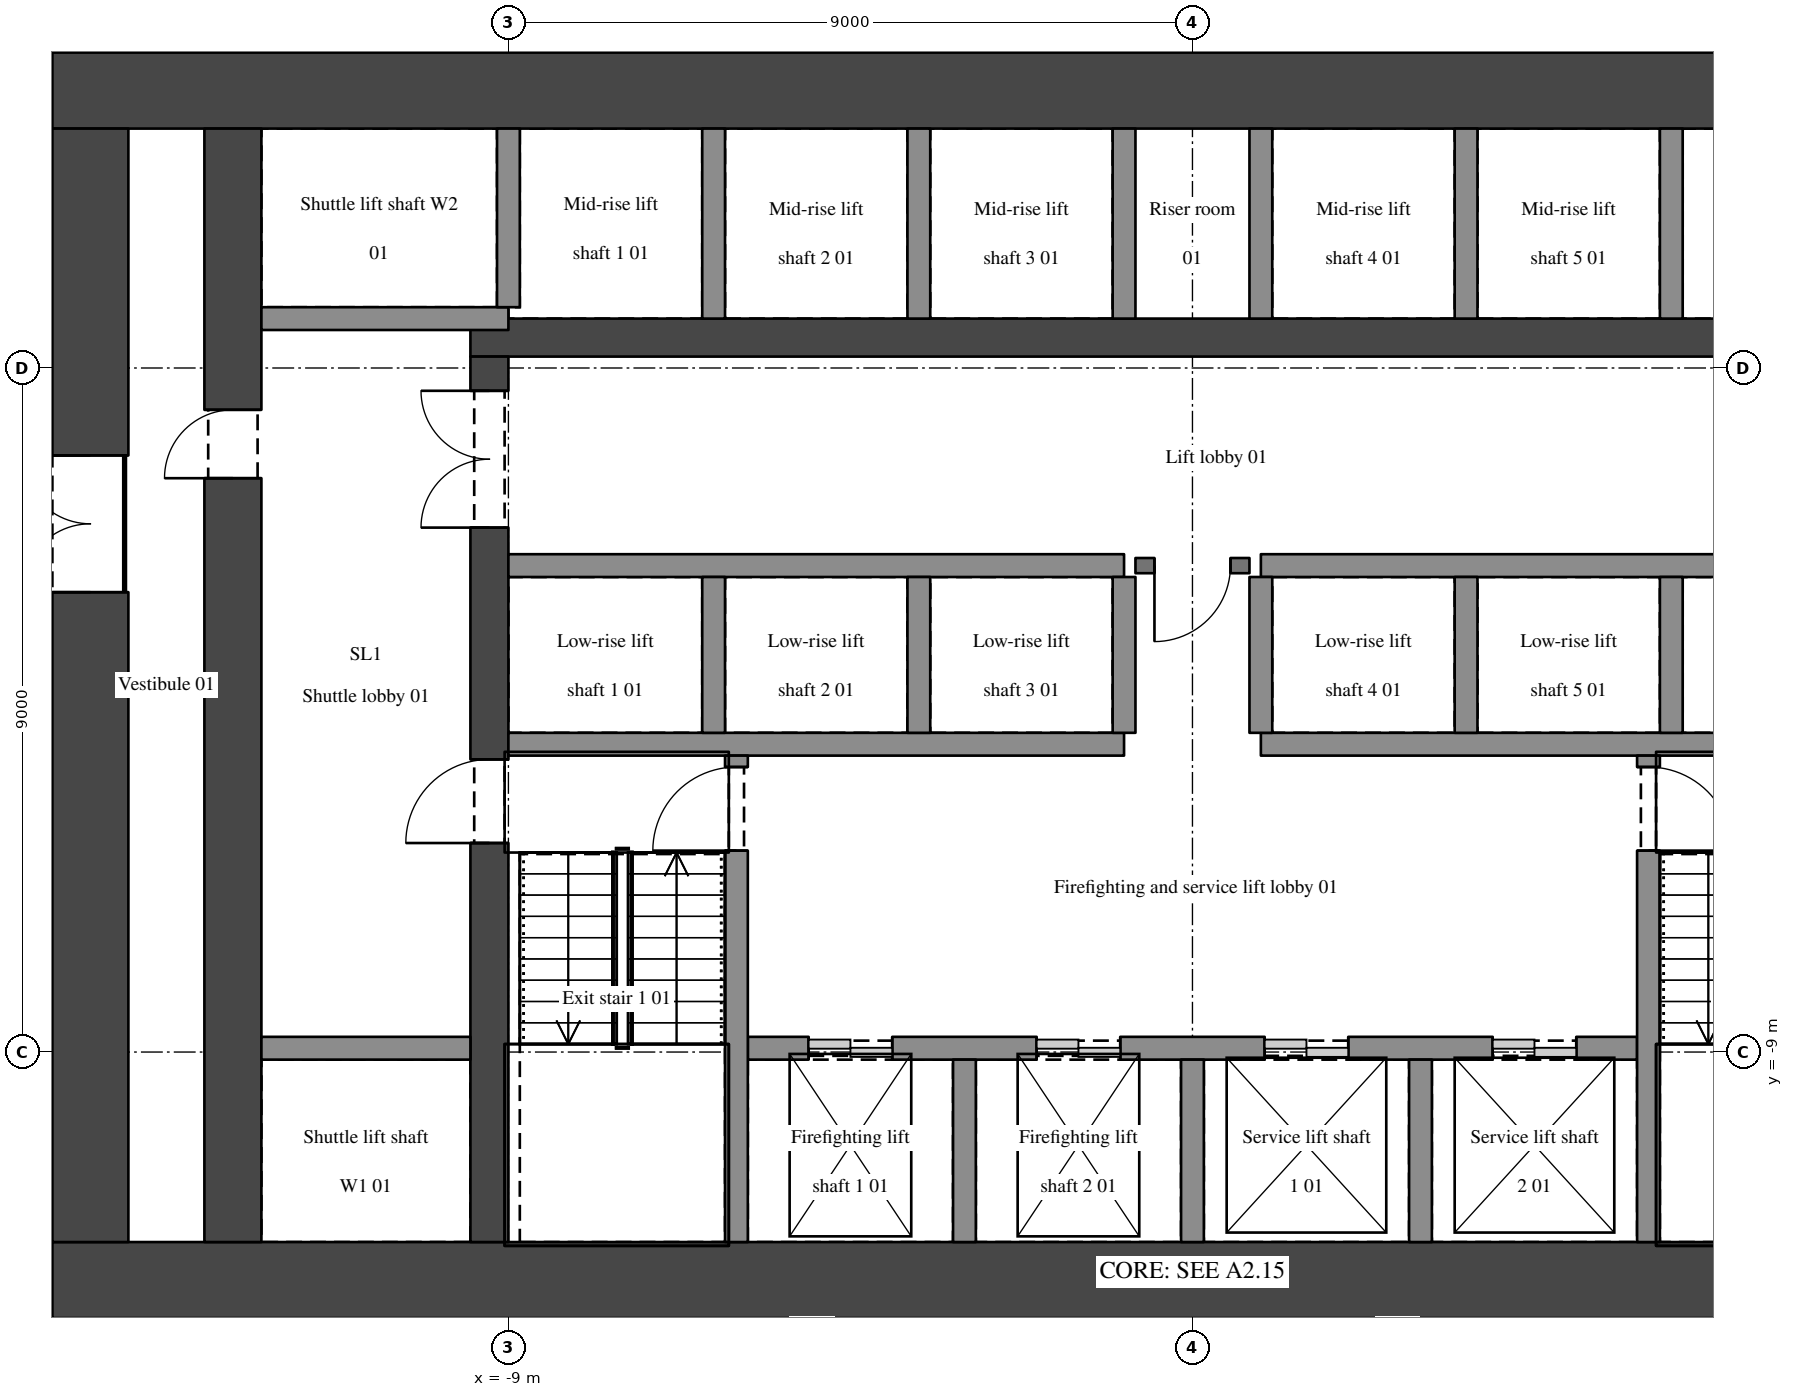
"""IFC4 building model, lengths in metres.
Left out: names, types, materials, properties, quantities, classifications, styles, units other than length and angle.
Written with IfcOpenShell. Run it as: python <this file> out.ifc"""

import sys

from ifc_helpers import new_model, si_unit, direction, frame, frame_2d, origin, place, context, subcontext, project, spatial, rectangle, extrude, element, fill, save


model = new_model("IFC4")
c1 = context("Model", 3, precision=1e-05, world=origin(), true_north=direction((0.0, 1.0)))
c2 = subcontext(c1, "Body", "Model", "MODEL_VIEW")
j1 = project(units=[si_unit("LENGTHUNIT", "METRE"), si_unit("PLANEANGLEUNIT", "RADIAN")], contexts=[c1])
p1 = place(None, origin())
s1 = spatial("IfcSite", under=j1, at=p1, CompositionType="ELEMENT")
p2 = place(p1, origin())
s2 = spatial("IfcBuilding", under=s1, at=p2, CompositionType="ELEMENT")
p3 = place(p2, frame((0.0, 0.0, 114.3)))
s3 = spatial("IfcBuildingStorey", under=s2, at=p3, CompositionType="ELEMENT", Elevation=114.3)
for number, where, z_axis, x_axis in (
    (1, (-15.0, -12.0, 0.0), (0.0, 0.0, 1.0), (1.0, 0.0, 0.0)),
    (2, (-15.0, 3.65, 0.0), (0.0, 0.0, 1.0), (1.0, 0.0, 0.0)),
):
    element("IfcWall", number, at=place(p3, frame(where, z_axis=z_axis, x_axis=x_axis)), inside=s3, PredefinedType="SHEAR", context=c2, shape_type="SweptSolid", body=[
        extrude(rectangle(XDim=30.0, YDim=1.0, at=frame_2d((15.0, 0.0))), origin(), (0.0, 0.0, 1.0), 7.2),
    ])
p4 = place(p3, frame((-14.5, -11.5, 0.0), z_axis=(0.0, 0.0, 1.0), x_axis=(0.0, 1.0, 0.0)))
e3 = element("IfcWall", 3, at=p4, inside=s3, PredefinedType="SHEAR", context=c2, shape_type="SweptSolid", body=[
    extrude(rectangle(XDim=14.65, YDim=1.0, at=frame_2d((7.325, 0.0))), origin(), (0.0, 0.0, 1.0), 7.2),
])
p5 = place(p4, frame((8.55, 0.0, 0.0)))
e4 = element("IfcOpeningElement", 4, at=p5, cuts=e3, PredefinedType="OPENING", context=c2, shape_type="SweptSolid", body=[
    extrude(rectangle(XDim=1.8, YDim=2.1, at=frame_2d((0.9, 1.05))), frame((0.0, 0.51, 0.0), z_axis=(0.0, -1.0, 0.0), x_axis=(1.0, 0.0, 0.0)), (0.0, 0.0, 1.0), 1.02),
])
p6 = place(p3, frame((-12.625, -11.5, 0.0), z_axis=(0.0, 0.0, 1.0), x_axis=(0.0, 1.0, 0.0)))
e5 = element("IfcWall", 5, at=p6, inside=s3, PredefinedType="SHEAR", context=c2, shape_type="SweptSolid", body=[
    extrude(rectangle(XDim=14.65, YDim=0.75, at=frame_2d((7.325, 0.0))), origin(), (0.0, 0.0, 1.0), 7.2),
])
p7 = place(p6, frame((10.05, 0.0, 0.0)))
e6 = element("IfcOpeningElement", 6, at=p7, cuts=e5, PredefinedType="OPENING", context=c2, shape_type="SweptSolid", body=[
    extrude(rectangle(XDim=0.9, YDim=2.1, at=frame_2d((0.45, 1.05))), frame((0.0, 0.385, 0.0), z_axis=(0.0, -1.0, 0.0), x_axis=(1.0, 0.0, 0.0)), (0.0, 0.0, 1.0), 0.77),
])
p8 = place(p3, frame((-9.5, 0.4, 0.0), z_axis=(0.0, 0.0, 1.0), x_axis=(1.0, 0.0, 0.0)))
e7 = element("IfcWall", 7, at=p8, inside=s3, PredefinedType="SHEAR", context=c2, shape_type="SweptSolid", body=[
    extrude(rectangle(XDim=19.0, YDim=0.5, at=frame_2d((9.5, 0.0))), origin(), (0.0, 0.0, 1.0), 7.2),
])
p9 = place(p3, frame((-9.25, -11.5, 0.0), z_axis=(0.0, 0.0, 1.0), x_axis=(0.0, 1.0, 0.0)))
e8 = element("IfcWall", 8, at=p9, inside=s3, PredefinedType="SHEAR", context=c2, shape_type="SweptSolid", body=[
    extrude(rectangle(XDim=11.65, YDim=0.5, at=frame_2d((5.825, 0.0))), origin(), (0.0, 0.0, 1.0), 7.2),
])
p10 = place(p9, frame((9.4, 0.0, 0.0)))
e9 = element("IfcOpeningElement", 9, at=p10, cuts=e8, PredefinedType="OPENING", context=c2, shape_type="SweptSolid", body=[
    extrude(rectangle(XDim=1.8, YDim=2.1, at=frame_2d((0.9, 1.05))), frame((0.0, 0.26, 0.0), z_axis=(0.0, -1.0, 0.0), x_axis=(1.0, 0.0, 0.0)), (0.0, 0.0, 1.0), 0.52),
])
p11 = place(p9, frame((5.25, 0.0, 0.0)))
e10 = element("IfcOpeningElement", 10, at=p11, cuts=e8, PredefinedType="OPENING", context=c2, shape_type="SweptSolid", body=[
    extrude(rectangle(XDim=1.1, YDim=2.1, at=frame_2d((0.55, 1.05))), frame((0.0, 0.26, 0.0), z_axis=(0.0, -1.0, 0.0), x_axis=(1.0, 0.0, 0.0)), (0.0, 0.0, 1.0), 0.52),
])
p12 = place(p3, frame((-12.25, -8.95, 0.0), z_axis=(0.0, 0.0, 1.0), x_axis=(1.0, 0.0, 0.0)))
e11 = element("IfcWall", 11, at=p12, inside=s3, PredefinedType="SHEAR", context=c2, shape_type="SweptSolid", body=[
    extrude(rectangle(XDim=2.75, YDim=0.3, at=frame_2d((1.375, 0.0))), origin(), (0.0, 0.0, 1.0), 7.2),
])
p13 = place(p3, frame((-5.85, -8.95, 0.0), z_axis=(0.0, 0.0, 1.0), x_axis=(1.0, 0.0, 0.0)))
e12 = element("IfcWall", 12, at=p13, inside=s3, PredefinedType="SHEAR", context=c2, shape_type="SweptSolid", body=[
    extrude(rectangle(XDim=11.7, YDim=0.3, at=frame_2d((5.85, 0.0))), origin(), (0.0, 0.0, 1.0), 7.2),
])
p14 = place(p13, frame((0.8, 0.0, 0.0)))
e13 = element("IfcOpeningElement", 13, at=p14, cuts=e12, PredefinedType="OPENING", context=c2, shape_type="SweptSolid", body=[
    extrude(rectangle(XDim=1.1, YDim=2.1, at=frame_2d((0.55, 1.05))), frame((0.0, 0.16, 0.0), z_axis=(0.0, -1.0, 0.0), x_axis=(1.0, 0.0, 0.0)), (0.0, 0.0, 1.0), 0.32),
])
p15 = place(p13, frame((3.8, 0.0, 0.0)))
e14 = element("IfcOpeningElement", 14, at=p15, cuts=e12, PredefinedType="OPENING", context=c2, shape_type="SweptSolid", body=[
    extrude(rectangle(XDim=1.1, YDim=2.1, at=frame_2d((0.55, 1.05))), frame((0.0, 0.16, 0.0), z_axis=(0.0, -1.0, 0.0), x_axis=(1.0, 0.0, 0.0)), (0.0, 0.0, 1.0), 0.32),
])
p16 = place(p13, frame((6.8, 0.0, 0.0)))
e15 = element("IfcOpeningElement", 15, at=p16, cuts=e12, PredefinedType="OPENING", context=c2, shape_type="SweptSolid", body=[
    extrude(rectangle(XDim=1.1, YDim=2.1, at=frame_2d((0.55, 1.05))), frame((0.0, 0.16, 0.0), z_axis=(0.0, -1.0, 0.0), x_axis=(1.0, 0.0, 0.0)), (0.0, 0.0, 1.0), 0.32),
])
p17 = place(p13, frame((9.8, 0.0, 0.0)))
e16 = element("IfcOpeningElement", 16, at=p17, cuts=e12, PredefinedType="OPENING", context=c2, shape_type="SweptSolid", body=[
    extrude(rectangle(XDim=1.1, YDim=2.1, at=frame_2d((0.55, 1.05))), frame((0.0, 0.16, 0.0), z_axis=(0.0, -1.0, 0.0), x_axis=(1.0, 0.0, 0.0)), (0.0, 0.0, 1.0), 0.32),
])
for number, where, z_axis, x_axis in (
    (17, (-9.0, -4.95, 0.0), (0.0, 0.0, 1.0), (1.0, 0.0, 0.0)),
    (18, (0.9, -4.95, 0.0), (0.0, 0.0, 1.0), (1.0, 0.0, 0.0)),
    (19, (-9.0, -2.6, 0.0), (0.0, 0.0, 1.0), (1.0, 0.0, 0.0)),
):
    element("IfcWall", number, at=place(p3, frame(where, z_axis=z_axis, x_axis=x_axis)), inside=s3, PredefinedType="SHEAR", context=c2, shape_type="SweptSolid", body=[
        extrude(rectangle(XDim=8.1, YDim=0.3, at=frame_2d((4.05, 0.0))), origin(), (0.0, 0.0, 1.0), 7.2),
    ])
p18 = place(p3, frame((0.75, -2.6, 0.0), z_axis=(0.0, 0.0, 1.0), x_axis=(-1.0, 0.0, 0.0)))
e20 = element("IfcWall", 20, at=p18, inside=s3, PredefinedType="SOLIDWALL", context=c2, shape_type="SweptSolid", body=[
    extrude(rectangle(XDim=1.5, YDim=0.2, at=frame_2d((0.75, 0.0))), origin(), (0.0, 0.0, 1.0), 6.9),
])
p19 = place(p18, frame((0.25, 0.0, 0.0)))
e21 = element("IfcOpeningElement", 21, at=p19, cuts=e20, PredefinedType="OPENING", context=c2, shape_type="SweptSolid", body=[
    extrude(rectangle(XDim=1.0, YDim=2.1, at=frame_2d((0.5, 1.05))), frame((0.0, 0.11, 0.0), z_axis=(0.0, -1.0, 0.0), x_axis=(1.0, 0.0, 0.0)), (0.0, 0.0, 1.0), 0.22),
])
p20 = place(p3, frame((0.9, -2.6, 0.0), z_axis=(0.0, 0.0, 1.0), x_axis=(1.0, 0.0, 0.0)))
e22 = element("IfcWall", 22, at=p20, inside=s3, PredefinedType="SHEAR", context=c2, shape_type="SweptSolid", body=[
    extrude(rectangle(XDim=8.1, YDim=0.3, at=frame_2d((4.05, 0.0))), origin(), (0.0, 0.0, 1.0), 7.2),
])
p21 = place(p3, frame((-9.0, 0.65, 0.0), z_axis=(0.0, 0.0, 1.0), x_axis=(-1.0, 0.0, 0.0)))
e23 = element("IfcWall", 23, at=p21, inside=s3, PredefinedType="SHEAR", context=c2, shape_type="SweptSolid", body=[
    extrude(rectangle(XDim=3.25, YDim=0.3, at=frame_2d((1.625, 0.0))), origin(), (0.0, 0.0, 1.0), 7.2),
])
p22 = place(p3, frame((-9.0, 0.8, 0.0), z_axis=(0.0, 0.0, 1.0), x_axis=(0.0, 1.0, 0.0)))
e24 = element("IfcWall", 24, at=p22, inside=s3, PredefinedType="SHEAR", context=c2, shape_type="SweptSolid", body=[
    extrude(rectangle(XDim=2.35, YDim=0.3, at=frame_2d((1.175, 0.0))), origin(), (0.0, 0.0, 1.0), 7.2),
])
p23 = place(p3, frame((-6.3, -4.8, 0.0), z_axis=(0.0, 0.0, 1.0), x_axis=(0.0, 1.0, 0.0)))
e25 = element("IfcWall", 25, at=p23, inside=s3, PredefinedType="SHEAR", context=c2, shape_type="SweptSolid", body=[
    extrude(rectangle(XDim=2.05, YDim=0.3, at=frame_2d((1.025, 0.0))), origin(), (0.0, 0.0, 1.0), 7.2),
])
p24 = place(p3, frame((-6.3, 0.65, 0.0), z_axis=(0.0, 0.0, 1.0), x_axis=(0.0, 1.0, 0.0)))
e26 = element("IfcWall", 26, at=p24, inside=s3, PredefinedType="SHEAR", context=c2, shape_type="SweptSolid", body=[
    extrude(rectangle(XDim=2.5, YDim=0.3, at=frame_2d((1.25, 0.0))), origin(), (0.0, 0.0, 1.0), 7.2),
])
p25 = place(p3, frame((-6.0, -11.5, 0.0), z_axis=(0.0, 0.0, 1.0), x_axis=(0.0, 1.0, 0.0)))
e27 = element("IfcWall", 27, at=p25, inside=s3, PredefinedType="SHEAR", context=c2, shape_type="SweptSolid", body=[
    extrude(rectangle(XDim=6.4, YDim=0.3, at=frame_2d((3.2, 0.0))), origin(), (0.0, 0.0, 1.0), 7.2),
])
p26 = place(p25, frame((5.15, 0.0, 0.0)))
e28 = element("IfcOpeningElement", 28, at=p26, cuts=e27, PredefinedType="OPENING", context=c2, shape_type="SweptSolid", body=[
    extrude(rectangle(XDim=1.1, YDim=2.1, at=frame_2d((0.55, 1.05))), frame((0.0, 0.16, 0.0), z_axis=(0.0, -1.0, 0.0), x_axis=(1.0, 0.0, 0.0)), (0.0, 0.0, 1.0), 0.32),
])
p27 = place(p3, frame((-3.6, -4.8, 0.0), z_axis=(0.0, 0.0, 1.0), x_axis=(0.0, 1.0, 0.0)))
e29 = element("IfcWall", 29, at=p27, inside=s3, PredefinedType="SHEAR", context=c2, shape_type="SweptSolid", body=[
    extrude(rectangle(XDim=2.05, YDim=0.3, at=frame_2d((1.025, 0.0))), origin(), (0.0, 0.0, 1.0), 7.2),
])
p28 = place(p3, frame((-3.6, 0.65, 0.0), z_axis=(0.0, 0.0, 1.0), x_axis=(0.0, 1.0, 0.0)))
e30 = element("IfcWall", 30, at=p28, inside=s3, PredefinedType="SHEAR", context=c2, shape_type="SweptSolid", body=[
    extrude(rectangle(XDim=2.5, YDim=0.3, at=frame_2d((1.25, 0.0))), origin(), (0.0, 0.0, 1.0), 7.2),
])
p29 = place(p3, frame((-3.0, -11.5, 0.0), z_axis=(0.0, 0.0, 1.0), x_axis=(0.0, 1.0, 0.0)))
e31 = element("IfcWall", 31, at=p29, inside=s3, PredefinedType="SHEAR", context=c2, shape_type="SweptSolid", body=[
    extrude(rectangle(XDim=2.4, YDim=0.3, at=frame_2d((1.2, 0.0))), origin(), (0.0, 0.0, 1.0), 7.2),
])
p30 = place(p3, frame((-0.9, -4.8, 0.0), z_axis=(0.0, 0.0, 1.0), x_axis=(0.0, 1.0, 0.0)))
e32 = element("IfcWall", 32, at=p30, inside=s3, PredefinedType="SHEAR", context=c2, shape_type="SweptSolid", body=[
    extrude(rectangle(XDim=2.05, YDim=0.3, at=frame_2d((1.025, 0.0))), origin(), (0.0, 0.0, 1.0), 7.2),
])
p31 = place(p3, frame((-0.9, 0.65, 0.0), z_axis=(0.0, 0.0, 1.0), x_axis=(0.0, 1.0, 0.0)))
e33 = element("IfcWall", 33, at=p31, inside=s3, PredefinedType="SHEAR", context=c2, shape_type="SweptSolid", body=[
    extrude(rectangle(XDim=2.5, YDim=0.3, at=frame_2d((1.25, 0.0))), origin(), (0.0, 0.0, 1.0), 7.2),
])
p32 = place(p3, frame((0.0, -11.5, 0.0), z_axis=(0.0, 0.0, 1.0), x_axis=(0.0, 1.0, 0.0)))
e34 = element("IfcWall", 34, at=p32, inside=s3, PredefinedType="SHEAR", context=c2, shape_type="SweptSolid", body=[
    extrude(rectangle(XDim=2.4, YDim=0.3, at=frame_2d((1.2, 0.0))), origin(), (0.0, 0.0, 1.0), 7.2),
])
p33 = place(p3, frame((0.9, -4.8, 0.0), z_axis=(0.0, 0.0, 1.0), x_axis=(0.0, 1.0, 0.0)))
e35 = element("IfcWall", 35, at=p33, inside=s3, PredefinedType="SHEAR", context=c2, shape_type="SweptSolid", body=[
    extrude(rectangle(XDim=2.05, YDim=0.3, at=frame_2d((1.025, 0.0))), origin(), (0.0, 0.0, 1.0), 7.2),
])
p34 = place(p3, frame((0.9, 0.65, 0.0), z_axis=(0.0, 0.0, 1.0), x_axis=(0.0, 1.0, 0.0)))
e36 = element("IfcWall", 36, at=p34, inside=s3, PredefinedType="SHEAR", context=c2, shape_type="SweptSolid", body=[
    extrude(rectangle(XDim=2.5, YDim=0.3, at=frame_2d((1.25, 0.0))), origin(), (0.0, 0.0, 1.0), 7.2),
])
p35 = place(p3, frame((3.0, -11.5, 0.0), z_axis=(0.0, 0.0, 1.0), x_axis=(0.0, 1.0, 0.0)))
e37 = element("IfcWall", 37, at=p35, inside=s3, PredefinedType="SHEAR", context=c2, shape_type="SweptSolid", body=[
    extrude(rectangle(XDim=2.4, YDim=0.3, at=frame_2d((1.2, 0.0))), origin(), (0.0, 0.0, 1.0), 7.2),
])
p36 = place(p3, frame((3.6, -4.8, 0.0), z_axis=(0.0, 0.0, 1.0), x_axis=(0.0, 1.0, 0.0)))
e38 = element("IfcWall", 38, at=p36, inside=s3, PredefinedType="SHEAR", context=c2, shape_type="SweptSolid", body=[
    extrude(rectangle(XDim=2.05, YDim=0.3, at=frame_2d((1.025, 0.0))), origin(), (0.0, 0.0, 1.0), 7.2),
])
p37 = place(p3, frame((3.6, 0.65, 0.0), z_axis=(0.0, 0.0, 1.0), x_axis=(0.0, 1.0, 0.0)))
e39 = element("IfcWall", 39, at=p37, inside=s3, PredefinedType="SHEAR", context=c2, shape_type="SweptSolid", body=[
    extrude(rectangle(XDim=2.5, YDim=0.3, at=frame_2d((1.25, 0.0))), origin(), (0.0, 0.0, 1.0), 7.2),
])
p38 = place(p3, frame((6.0, -5.1, 0.0), z_axis=(0.0, 0.0, 1.0), x_axis=(0.0, -1.0, 0.0)))
e40 = element("IfcWall", 40, at=p38, inside=s3, PredefinedType="SHEAR", context=c2, shape_type="SweptSolid", body=[
    extrude(rectangle(XDim=6.4, YDim=0.3, at=frame_2d((3.2, 0.0))), origin(), (0.0, 0.0, 1.0), 7.2),
])
p39 = place(p38, frame((0.15, 0.0, 0.0)))
e41 = element("IfcOpeningElement", 41, at=p39, cuts=e40, PredefinedType="OPENING", context=c2, shape_type="SweptSolid", body=[
    extrude(rectangle(XDim=1.1, YDim=2.1, at=frame_2d((0.55, 1.05))), frame((0.0, 0.16, 0.0), z_axis=(0.0, -1.0, 0.0), x_axis=(1.0, 0.0, 0.0)), (0.0, 0.0, 1.0), 0.32),
])
p40 = place(p3, frame((6.3, -4.8, 0.0), z_axis=(0.0, 0.0, 1.0), x_axis=(0.0, 1.0, 0.0)))
e42 = element("IfcWall", 42, at=p40, inside=s3, PredefinedType="SHEAR", context=c2, shape_type="SweptSolid", body=[
    extrude(rectangle(XDim=2.05, YDim=0.3, at=frame_2d((1.025, 0.0))), origin(), (0.0, 0.0, 1.0), 7.2),
])
p41 = place(p3, frame((6.3, 0.65, 0.0), z_axis=(0.0, 0.0, 1.0), x_axis=(0.0, 1.0, 0.0)))
e43 = element("IfcWall", 43, at=p41, inside=s3, PredefinedType="SHEAR", context=c2, shape_type="SweptSolid", body=[
    extrude(rectangle(XDim=2.5, YDim=0.3, at=frame_2d((1.25, 0.0))), origin(), (0.0, 0.0, 1.0), 7.2),
])
p42 = place(p10, origin())
e44 = element("IfcDoor", 44, at=p42, inside=s3, OperationType="DOUBLE_DOOR_SINGLE_SWING", PredefinedType="DOOR", context=c2, shape_type="SweptSolid", body=[
    extrude(rectangle(XDim=1.8, YDim=2.1, at=frame_2d((0.9, 1.05))), frame((0.0, 0.025, 0.0), z_axis=(0.0, -1.0, 0.0), x_axis=(1.0, 0.0, 0.0)), (0.0, 0.0, 1.0), 0.05),
])
fill(e9, e44)
p43 = place(p19, origin())
e45 = element("IfcDoor", 45, at=p43, inside=s3, OperationType="SINGLE_SWING_RIGHT", PredefinedType="DOOR", context=c2, shape_type="SweptSolid", body=[
    extrude(rectangle(XDim=1.0, YDim=2.1, at=frame_2d((0.5, 1.05))), frame((0.0, 0.025, 0.0), z_axis=(0.0, -1.0, 0.0), x_axis=(1.0, 0.0, 0.0)), (0.0, 0.0, 1.0), 0.05),
])
fill(e21, e45)
p44 = place(p26, origin())
e46 = element("IfcDoor", 46, at=p44, inside=s3, OperationType="SINGLE_SWING_LEFT", PredefinedType="DOOR", context=c2, shape_type="SweptSolid", body=[
    extrude(rectangle(XDim=1.1, YDim=2.1, at=frame_2d((0.55, 1.05))), frame((0.0, 0.025, 0.0), z_axis=(0.0, -1.0, 0.0), x_axis=(1.0, 0.0, 0.0)), (0.0, 0.0, 1.0), 0.05),
])
fill(e28, e46)
p45 = place(p11, origin())
e47 = element("IfcDoor", 47, at=p45, inside=s3, OperationType="SINGLE_SWING_LEFT", PredefinedType="DOOR", context=c2, shape_type="SweptSolid", body=[
    extrude(rectangle(XDim=1.1, YDim=2.1, at=frame_2d((0.55, 1.05))), frame((0.0, 0.025, 0.0), z_axis=(0.0, -1.0, 0.0), x_axis=(1.0, 0.0, 0.0)), (0.0, 0.0, 1.0), 0.05),
])
fill(e10, e47)
p46 = place(p39, origin())
e48 = element("IfcDoor", 48, at=p46, inside=s3, OperationType="SINGLE_SWING_RIGHT", PredefinedType="DOOR", context=c2, shape_type="SweptSolid", body=[
    extrude(rectangle(XDim=1.1, YDim=2.1, at=frame_2d((0.55, 1.05))), frame((0.0, 0.025, 0.0), z_axis=(0.0, -1.0, 0.0), x_axis=(1.0, 0.0, 0.0)), (0.0, 0.0, 1.0), 0.05),
])
fill(e41, e48)
p47 = place(p7, origin())
e49 = element("IfcDoor", 49, at=p47, inside=s3, OperationType="SINGLE_SWING_LEFT", PredefinedType="DOOR", context=c2, shape_type="SweptSolid", body=[
    extrude(rectangle(XDim=0.9, YDim=2.1, at=frame_2d((0.45, 1.05))), frame((0.0, 0.025, 0.0), z_axis=(0.0, -1.0, 0.0), x_axis=(1.0, 0.0, 0.0)), (0.0, 0.0, 1.0), 0.05),
])
fill(e6, e49)
p48 = place(p14, origin())
e50 = element("IfcDoor", 50, at=p48, inside=s3, OperationType="DOUBLE_DOOR_SLIDING", PredefinedType="DOOR", context=c2, shape_type="SweptSolid", body=[
    extrude(rectangle(XDim=1.1, YDim=2.1, at=frame_2d((0.55, 1.05))), frame((0.0, 0.025, 0.0), z_axis=(0.0, -1.0, 0.0), x_axis=(1.0, 0.0, 0.0)), (0.0, 0.0, 1.0), 0.05),
])
fill(e13, e50)
p49 = place(p15, origin())
e51 = element("IfcDoor", 51, at=p49, inside=s3, OperationType="DOUBLE_DOOR_SLIDING", PredefinedType="DOOR", context=c2, shape_type="SweptSolid", body=[
    extrude(rectangle(XDim=1.1, YDim=2.1, at=frame_2d((0.55, 1.05))), frame((0.0, 0.025, 0.0), z_axis=(0.0, -1.0, 0.0), x_axis=(1.0, 0.0, 0.0)), (0.0, 0.0, 1.0), 0.05),
])
fill(e14, e51)
p50 = place(p16, origin())
e52 = element("IfcDoor", 52, at=p50, inside=s3, OperationType="DOUBLE_DOOR_SLIDING", PredefinedType="DOOR", context=c2, shape_type="SweptSolid", body=[
    extrude(rectangle(XDim=1.1, YDim=2.1, at=frame_2d((0.55, 1.05))), frame((0.0, 0.025, 0.0), z_axis=(0.0, -1.0, 0.0), x_axis=(1.0, 0.0, 0.0)), (0.0, 0.0, 1.0), 0.05),
])
fill(e15, e52)
p51 = place(p17, origin())
e53 = element("IfcDoor", 53, at=p51, inside=s3, OperationType="DOUBLE_DOOR_SLIDING", PredefinedType="DOOR", context=c2, shape_type="SweptSolid", body=[
    extrude(rectangle(XDim=1.1, YDim=2.1, at=frame_2d((0.55, 1.05))), frame((0.0, 0.025, 0.0), z_axis=(0.0, -1.0, 0.0), x_axis=(1.0, 0.0, 0.0)), (0.0, 0.0, 1.0), 0.05),
])
fill(e16, e53)
p52 = place(p5, origin())
e54 = element("IfcDoor", 54, at=p52, inside=s3, OperationType="DOUBLE_DOOR_SINGLE_SWING", PredefinedType="DOOR", context=c2, shape_type="SweptSolid", body=[
    extrude(rectangle(XDim=1.8, YDim=2.1, at=frame_2d((0.9, 1.05))), frame((0.0, 0.025, 0.0), z_axis=(0.0, -1.0, 0.0), x_axis=(1.0, 0.0, 0.0)), (0.0, 0.0, 1.0), 0.05),
])
fill(e4, e54)
save(model, sys.argv[1])
